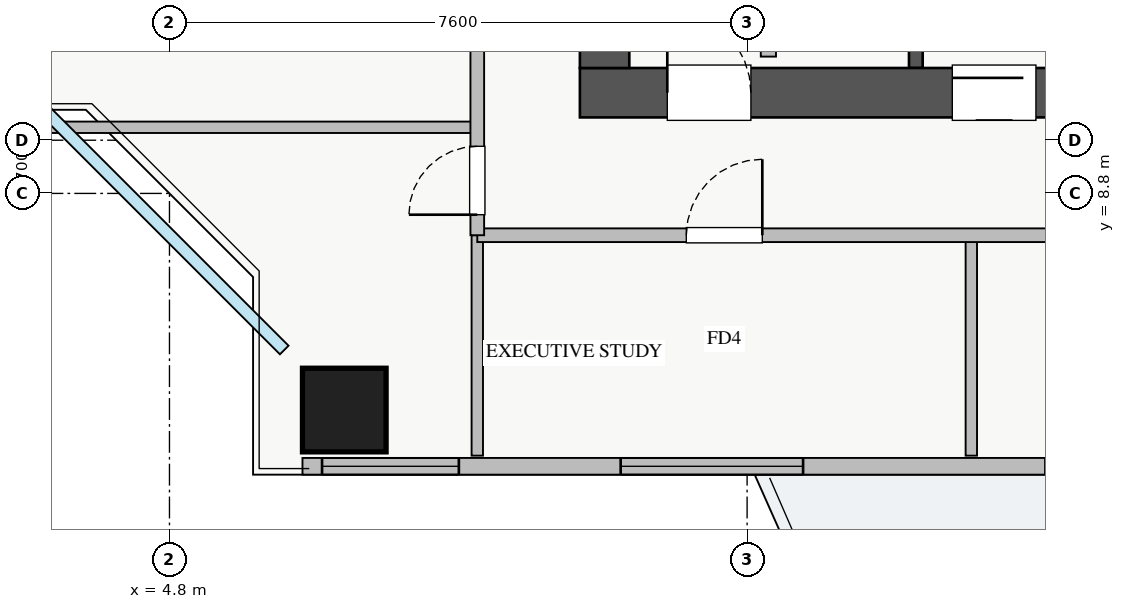
"""IFC4 building model, lengths in metres.
Left out: names, types, materials, properties, quantities, classifications, styles, units other than length and angle.
Written with IfcOpenShell. Run it as: python <this file> out.ifc"""

import sys

from ifc_helpers import new_model, si_unit, direction, frame, frame_2d, origin, origin_2d, place, context, subcontext, project, spatial, rectangle, extrude, source, transform, mapped, element, fill, save


model = new_model("IFC4")
c1 = context("Model", 3, precision=1e-05, world=origin(), true_north=direction((0.0, 1.0)))
c2 = subcontext(c1, "Body", "Model", "MODEL_VIEW")
j1 = project(units=[si_unit("LENGTHUNIT", "METRE"), si_unit("PLANEANGLEUNIT", "RADIAN")], contexts=[c1])
p1 = place(None, origin())
s1 = spatial("IfcSite", under=j1, at=p1, CompositionType="ELEMENT")
p2 = place(p1, origin())
s2 = spatial("IfcBuilding", under=s1, at=p2, CompositionType="ELEMENT")
p3 = place(p2, frame((0.0, 0.0, 116.5)))
s3 = spatial("IfcBuildingStorey", under=s2, at=p3, CompositionType="ELEMENT", Elevation=116.5)
p4 = place(p3, frame((14.62, 10.45, 0.0), z_axis=(0.0, 0.0, 1.0), x_axis=(0.0, 1.0, 0.0)))
e1 = element("IfcWall", 1, at=p4, inside=s3, PredefinedType="SHEAR", context=c2, shape_type="SweptSolid", body=[
    extrude(rectangle(XDim=2.35, YDim=0.18, at=frame_2d((1.175, 0.0))), origin(), (0.0, 0.0, 1.0), 3.07),
])
p5 = place(p3, frame((10.2, 10.125, 0.0), z_axis=(0.0, 0.0, 1.0), x_axis=(1.0, 0.0, 0.0)))
e2 = element("IfcWall", 2, at=p5, inside=s3, PredefinedType="SHEAR", context=c2, shape_type="SweptSolid", body=[
    extrude(rectangle(XDim=17.6, YDim=0.65, at=frame_2d((8.8, 0.0))), origin(), (0.0, 0.0, 1.0), 3.25),
])
p6 = place(p5, frame((1.15, 0.0, 0.0)))
e3 = element("IfcOpeningElement", 3, at=p6, cuts=e2, PredefinedType="OPENING", context=c2, shape_type="SweptSolid", body=[
    extrude(rectangle(XDim=1.1, YDim=2.05, at=frame_2d((0.55, 1.025))), frame((0.0, 0.335, 0.0), z_axis=(0.0, -1.0, 0.0), x_axis=(1.0, 0.0, 0.0)), (0.0, 0.0, 1.0), 0.67),
])
p7 = place(p5, frame((8.3, 0.0, 0.0)))
e4 = element("IfcOpeningElement", 4, at=p7, cuts=e2, PredefinedType="OPENING", context=c2, shape_type="SweptSolid", body=[
    extrude(rectangle(XDim=1.1, YDim=2.05, at=frame_2d((0.55, 1.025))), frame((0.0, 0.335, 0.0), z_axis=(0.0, -1.0, 0.0), x_axis=(1.0, 0.0, 0.0)), (0.0, 0.0, 1.0), 0.67),
])
p8 = place(p5, frame((4.9, 0.0, 0.0)))
e5 = element("IfcOpeningElement", 5, at=p8, cuts=e2, PredefinedType="OPENING", context=c2, shape_type="SweptSolid", body=[
    extrude(rectangle(XDim=1.1, YDim=2.05, at=frame_2d((0.55, 1.025))), frame((0.0, 0.335, 0.0), z_axis=(0.0, -1.0, 0.0), x_axis=(1.0, 0.0, 0.0)), (0.0, 0.0, 1.0), 0.67),
])
p9 = place(p5, frame((14.74, 0.0, 0.0)))
e6 = element("IfcOpeningElement", 6, at=p9, cuts=e2, PredefinedType="OPENING", context=c2, shape_type="SweptSolid", body=[
    extrude(rectangle(XDim=1.0, YDim=2.05, at=frame_2d((0.5, 1.025))), frame((0.0, 0.335, 0.0), z_axis=(0.0, -1.0, 0.0), x_axis=(1.0, 0.0, 0.0)), (0.0, 0.0, 1.0), 0.67),
])
p10 = place(p5, frame((11.67, 0.0, 0.0)))
e7 = element("IfcOpeningElement", 7, at=p10, cuts=e2, PredefinedType="OPENING", context=c2, shape_type="SweptSolid", body=[
    extrude(rectangle(XDim=1.0, YDim=2.05, at=frame_2d((0.5, 1.025))), frame((0.0, 0.335, 0.0), z_axis=(0.0, -1.0, 0.0), x_axis=(1.0, 0.0, 0.0)), (0.0, 0.0, 1.0), 0.67),
])
p11 = place(p3, frame((10.525, 10.45, 0.0), z_axis=(0.0, 0.0, 1.0), x_axis=(0.0, 1.0, 0.0)))
e8 = element("IfcWall", 8, at=p11, inside=s3, PredefinedType="SHEAR", context=c2, shape_type="SweptSolid", body=[
    extrude(rectangle(XDim=5.9, YDim=0.65, at=frame_2d((2.95, 0.0))), origin(), (0.0, 0.0, 1.0), 3.25),
])
m1 = source(origin(), c2, "Body", "SweptSolid", [
    extrude(rectangle(XDim=1.1, YDim=1.1, at=origin_2d()), origin(), (0.0, 0.0, 1.0), 3.25),
])
p12 = place(p3, frame((7.1, 5.95, 0.0), z_axis=(0.0, 0.0, 1.0), x_axis=(1.0, 0.0, 0.0)))
e9 = element("IfcColumn", 9, at=p12, inside=s3, PredefinedType="COLUMN", context=c2, shape_type="MappedRepresentation", body=[
    mapped(m1, transform((0.0, 0.0, 0.0), x_axis=(1.0, 0.0, 0.0), y_axis=(0.0, 1.0, 0.0), z_axis=(0.0, 0.0, 1.0), scale=1.0)),
])
p13 = place(p3, frame((6.55, 5.21, 0.0), z_axis=(0.0, 0.0, 1.0), x_axis=(1.0, 0.0, 0.0)))
e10 = element("IfcWall", 10, at=p13, inside=s3, PredefinedType="STANDARD", context=c2, shape_type="SweptSolid", body=[
    extrude(rectangle(XDim=24.9, YDim=0.22, at=frame_2d((12.45, 0.0))), origin(), (0.0, 0.0, 1.0), 2.61),
])
p14 = place(p13, frame((13.3, 0.0, 0.0)))
e11 = element("IfcOpeningElement", 11, at=p14, cuts=e10, PredefinedType="OPENING", context=c2, shape_type="SweptSolid", body=[
    extrude(rectangle(XDim=1.2, YDim=2.1, at=frame_2d((0.6, 1.05))), frame((0.0, 0.12, 0.0), z_axis=(0.0, -1.0, 0.0), x_axis=(1.0, 0.0, 0.0)), (0.0, 0.0, 1.0), 0.24),
])
p15 = place(p13, frame((0.258, 0.0, 0.9)))
e12 = element("IfcOpeningElement", 12, at=p15, cuts=e10, PredefinedType="OPENING", context=c2, shape_type="SweptSolid", body=[
    extrude(rectangle(XDim=1.8, YDim=1.5, at=frame_2d((0.9, 0.75))), frame((0.0, 0.12, 0.0), z_axis=(0.0, -1.0, 0.0), x_axis=(1.0, 0.0, 0.0)), (0.0, 0.0, 1.0), 0.24),
])
p16 = place(p13, frame((9.775, 0.0, 0.9)))
e13 = element("IfcOpeningElement", 13, at=p16, cuts=e10, PredefinedType="OPENING", context=c2, shape_type="SweptSolid", body=[
    extrude(rectangle(XDim=1.8, YDim=1.5, at=frame_2d((0.9, 0.75))), frame((0.0, 0.12, 0.0), z_axis=(0.0, -1.0, 0.0), x_axis=(1.0, 0.0, 0.0)), (0.0, 0.0, 1.0), 0.24),
])
p17 = place(p13, frame((14.813, 0.0, 0.9)))
e14 = element("IfcOpeningElement", 14, at=p17, cuts=e10, PredefinedType="OPENING", context=c2, shape_type="SweptSolid", body=[
    extrude(rectangle(XDim=1.5, YDim=1.45, at=frame_2d((0.75, 0.725))), frame((0.0, 0.12, 0.0), z_axis=(0.0, -1.0, 0.0), x_axis=(1.0, 0.0, 0.0)), (0.0, 0.0, 1.0), 0.24),
])
p18 = place(p13, frame((20.738, 0.0, 0.9)))
e15 = element("IfcOpeningElement", 15, at=p18, cuts=e10, PredefinedType="OPENING", context=c2, shape_type="SweptSolid", body=[
    extrude(rectangle(XDim=2.1, YDim=1.48, at=frame_2d((1.05, 0.74))), frame((0.0, 0.12, 0.0), z_axis=(0.0, -1.0, 0.0), x_axis=(1.0, 0.0, 0.0)), (0.0, 0.0, 1.0), 0.24),
])
p19 = place(p13, frame((4.187, 0.0, 0.9)))
e16 = element("IfcOpeningElement", 16, at=p19, cuts=e10, PredefinedType="OPENING", context=c2, shape_type="SweptSolid", body=[
    extrude(rectangle(XDim=2.4, YDim=1.5, at=frame_2d((1.2, 0.75))), frame((0.0, 0.12, 0.0), z_axis=(0.0, -1.0, 0.0), x_axis=(1.0, 0.0, 0.0)), (0.0, 0.0, 1.0), 0.24),
])
p20 = place(p3, frame((12.68, 10.6, 0.0), z_axis=(0.0, 0.0, 1.0), x_axis=(0.0, 1.0, 0.0)))
e17 = element("IfcWall", 17, at=p20, inside=s3, PredefinedType="PARTITIONING", context=c2, shape_type="SweptSolid", body=[
    extrude(rectangle(XDim=2.21, YDim=0.2, at=frame_2d((1.105, 0.0))), origin(), (0.0, 0.0, 1.0), 3.07),
])
for number, where, z_axis, x_axis in (
    (18, (15.35, 5.35, 0.0), (0.0, 0.0, 1.0), (0.0, 1.0, 0.0)),
    (19, (8.85, 5.35, 0.0), (0.0, 0.0, 1.0), (0.0, 1.0, 0.0)),
):
    element("IfcWall", number, at=place(p3, frame(where, z_axis=z_axis, x_axis=x_axis)), inside=s3, PredefinedType="PARTITIONING", context=c2, shape_type="SweptSolid", body=[
        extrude(rectangle(XDim=2.9, YDim=0.15, at=frame_2d((1.45, 0.0))), origin(), (0.0, 0.0, 1.0), 3.07),
    ])
p21 = place(p3, frame((8.85, 8.25, 0.0), z_axis=(0.0, 0.0, 1.0), x_axis=(1.0, 0.0, 0.0)))
e20 = element("IfcWall", 20, at=p21, inside=s3, PredefinedType="PARTITIONING", context=c2, shape_type="SweptSolid", body=[
    extrude(rectangle(XDim=23.57, YDim=0.18, at=frame_2d((11.785, 0.0))), origin(), (0.0, 0.0, 1.0), 3.07),
])
p22 = place(p21, frame((2.75, 0.0, 0.0)))
e21 = element("IfcOpeningElement", 21, at=p22, cuts=e20, PredefinedType="OPENING", context=c2, shape_type="SweptSolid", body=[
    extrude(rectangle(XDim=1.0, YDim=2.05, at=frame_2d((0.5, 1.025))), frame((0.0, 0.1, 0.0), z_axis=(0.0, -1.0, 0.0), x_axis=(1.0, 0.0, 0.0)), (0.0, 0.0, 1.0), 0.2),
])
p23 = place(p21, frame((7.875, 0.0, 0.0)))
e22 = element("IfcOpeningElement", 22, at=p23, cuts=e20, PredefinedType="OPENING", context=c2, shape_type="SweptSolid", body=[
    extrude(rectangle(XDim=1.0, YDim=2.05, at=frame_2d((0.5, 1.025))), frame((0.0, 0.1, 0.0), z_axis=(0.0, -1.0, 0.0), x_axis=(1.0, 0.0, 0.0)), (0.0, 0.0, 1.0), 0.2),
])
p24 = place(p21, frame((13.3, 0.0, 0.0)))
e23 = element("IfcOpeningElement", 23, at=p24, cuts=e20, PredefinedType="OPENING", context=c2, shape_type="SweptSolid", body=[
    extrude(rectangle(XDim=1.0, YDim=2.05, at=frame_2d((0.5, 1.025))), frame((0.0, 0.1, 0.0), z_axis=(0.0, -1.0, 0.0), x_axis=(1.0, 0.0, 0.0)), (0.0, 0.0, 1.0), 0.2),
])
p25 = place(p21, frame((19.74, 0.0, 0.0)))
e24 = element("IfcOpeningElement", 24, at=p25, cuts=e20, PredefinedType="OPENING", context=c2, shape_type="SweptSolid", body=[
    extrude(rectangle(XDim=1.0, YDim=2.05, at=frame_2d((0.5, 1.025))), frame((0.0, 0.1, 0.0), z_axis=(0.0, -1.0, 0.0), x_axis=(1.0, 0.0, 0.0)), (0.0, 0.0, 1.0), 0.2),
])
p26 = place(p3, frame((1.35, 9.67, 0.0), z_axis=(0.0, 0.0, 1.0), x_axis=(1.0, 0.0, 0.0)))
e25 = element("IfcWall", 25, at=p26, inside=s3, PredefinedType="PARTITIONING", context=c2, shape_type="SweptSolid", body=[
    extrude(rectangle(XDim=7.5, YDim=0.15, at=frame_2d((3.75, 0.0))), origin(), (0.0, 0.0, 1.0), 3.07),
])
p27 = place(p3, frame((8.85, 8.25, 0.0), z_axis=(0.0, 0.0, 1.0), x_axis=(0.0, 1.0, 0.0)))
e26 = element("IfcWall", 26, at=p27, inside=s3, PredefinedType="PARTITIONING", context=c2, shape_type="SweptSolid", body=[
    extrude(rectangle(XDim=29.5, YDim=0.18, at=frame_2d((14.75, 0.0))), origin(), (0.0, 0.0, 1.0), 3.07),
])
p28 = place(p27, frame((28.155, 0.0, 0.0)))
e27 = element("IfcOpeningElement", 27, at=p28, cuts=e26, PredefinedType="OPENING", context=c2, shape_type="SweptSolid", body=[
    extrude(rectangle(XDim=0.9, YDim=2.05, at=frame_2d((0.45, 1.025))), frame((0.0, 0.1, 0.0), z_axis=(0.0, -1.0, 0.0), x_axis=(1.0, 0.0, 0.0)), (0.0, 0.0, 1.0), 0.2),
])
p29 = place(p27, frame((0.27, 0.0, 0.0)))
e28 = element("IfcOpeningElement", 28, at=p29, cuts=e26, PredefinedType="OPENING", context=c2, shape_type="SweptSolid", body=[
    extrude(rectangle(XDim=0.9, YDim=2.05, at=frame_2d((0.45, 1.025))), frame((0.0, 0.1, 0.0), z_axis=(0.0, -1.0, 0.0), x_axis=(1.0, 0.0, 0.0)), (0.0, 0.0, 1.0), 0.2),
])
p30 = place(p27, frame((7.255, 0.0, 0.0)))
e29 = element("IfcOpeningElement", 29, at=p30, cuts=e26, PredefinedType="OPENING", context=c2, shape_type="SweptSolid", body=[
    extrude(rectangle(XDim=1.0, YDim=2.05, at=frame_2d((0.5, 1.025))), frame((0.0, 0.1, 0.0), z_axis=(0.0, -1.0, 0.0), x_axis=(1.0, 0.0, 0.0)), (0.0, 0.0, 1.0), 0.2),
])
p31 = place(p27, frame((16.675, 0.0, 0.0)))
e30 = element("IfcOpeningElement", 30, at=p31, cuts=e26, PredefinedType="OPENING", context=c2, shape_type="SweptSolid", body=[
    extrude(rectangle(XDim=1.0, YDim=2.05, at=frame_2d((0.5, 1.025))), frame((0.0, 0.1, 0.0), z_axis=(0.0, -1.0, 0.0), x_axis=(1.0, 0.0, 0.0)), (0.0, 0.0, 1.0), 0.2),
])
m2 = source(origin(), c2, "Body", "SweptSolid", [
    extrude(rectangle(XDim=1.8, YDim=1.5, at=frame_2d((0.9, 0.75))), frame((0.0, 0.03, 0.0), z_axis=(0.0, -1.0, 0.0), x_axis=(1.0, 0.0, 0.0)), (0.0, 0.0, 1.0), 0.06),
])
p32 = place(p15, origin())
e31 = element("IfcWindow", 31, at=p32, inside=s3, PartitioningType="TRIPLE_PANEL_VERTICAL", PredefinedType="WINDOW", context=c2, shape_type="MappedRepresentation", body=[
    mapped(m2, transform((0.0, 0.0, 0.0), x_axis=(1.0, 0.0, 0.0), y_axis=(0.0, 1.0, 0.0), z_axis=(0.0, 0.0, 1.0), scale=1.0)),
])
fill(e12, e31)
p33 = place(p16, origin())
e32 = element("IfcWindow", 32, at=p33, inside=s3, PartitioningType="DOUBLE_PANEL_VERTICAL", PredefinedType="WINDOW", context=c2, shape_type="MappedRepresentation", body=[
    mapped(m2, transform((0.0, 0.0, 0.0), x_axis=(1.0, 0.0, 0.0), y_axis=(0.0, 1.0, 0.0), z_axis=(0.0, 0.0, 1.0), scale=1.0)),
])
fill(e13, e32)
m3 = source(origin(), c2, "Body", "SweptSolid", [
    extrude(rectangle(XDim=1.1, YDim=2.05, at=frame_2d((0.55, 1.025))), frame((0.0, 0.025, 0.0), z_axis=(0.0, -1.0, 0.0), x_axis=(1.0, 0.0, 0.0)), (0.0, 0.0, 1.0), 0.05),
])
p34 = place(p6, origin())
e33 = element("IfcDoor", 33, at=p34, inside=s3, OperationType="SINGLE_SWING_LEFT", PredefinedType="DOOR", context=c2, shape_type="MappedRepresentation", body=[
    mapped(m3, transform((0.0, 0.0, 0.0), x_axis=(1.0, 0.0, 0.0), y_axis=(0.0, 1.0, 0.0), z_axis=(0.0, 0.0, 1.0), scale=1.0)),
])
fill(e3, e33)
p35 = place(p8, origin())
e34 = element("IfcDoor", 34, at=p35, inside=s3, OperationType="SLIDING_TO_RIGHT", PredefinedType="DOOR", context=c2, shape_type="MappedRepresentation", body=[
    mapped(m3, transform((0.0, 0.0, 0.0), x_axis=(1.0, 0.0, 0.0), y_axis=(0.0, 1.0, 0.0), z_axis=(0.0, 0.0, 1.0), scale=1.0)),
])
fill(e5, e34)
m4 = source(origin(), c2, "Body", "SweptSolid", [
    extrude(rectangle(XDim=1.0, YDim=2.05, at=frame_2d((0.5, 1.025))), frame((0.0, 0.025, 0.0), z_axis=(0.0, -1.0, 0.0), x_axis=(1.0, 0.0, 0.0)), (0.0, 0.0, 1.0), 0.05),
])
p36 = place(p22, origin())
e35 = element("IfcDoor", 35, at=p36, inside=s3, OperationType="SINGLE_SWING_RIGHT", PredefinedType="DOOR", context=c2, shape_type="MappedRepresentation", body=[
    mapped(m4, transform((0.0, 0.0, 0.0), x_axis=(1.0, 0.0, 0.0), y_axis=(0.0, 1.0, 0.0), z_axis=(0.0, 0.0, 1.0), scale=1.0)),
])
fill(e21, e35)
m5 = source(origin(), c2, "Body", "SweptSolid", [
    extrude(rectangle(XDim=0.9, YDim=2.05, at=frame_2d((0.45, 1.025))), frame((0.0, 0.025, 0.0), z_axis=(0.0, -1.0, 0.0), x_axis=(1.0, 0.0, 0.0)), (0.0, 0.0, 1.0), 0.05),
])
p37 = place(p29, origin())
e36 = element("IfcDoor", 36, at=p37, inside=s3, OperationType="SINGLE_SWING_LEFT", PredefinedType="DOOR", context=c2, shape_type="MappedRepresentation", body=[
    mapped(m5, transform((0.0, 0.0, 0.0), x_axis=(1.0, 0.0, 0.0), y_axis=(0.0, 1.0, 0.0), z_axis=(0.0, 0.0, 1.0), scale=1.0)),
])
fill(e28, e36)
m6 = source(origin(), c2, "Body", "SweptSolid", [
    extrude(rectangle(XDim=2.4, YDim=1.5, at=frame_2d((1.2, 0.75))), frame((0.0, 0.03, 0.0), z_axis=(0.0, -1.0, 0.0), x_axis=(1.0, 0.0, 0.0)), (0.0, 0.0, 1.0), 0.06),
])
p38 = place(p19, origin())
e37 = element("IfcWindow", 37, at=p38, inside=s3, PartitioningType="TRIPLE_PANEL_VERTICAL", PredefinedType="WINDOW", context=c2, shape_type="MappedRepresentation", body=[
    mapped(m6, transform((0.0, 0.0, 0.0), x_axis=(1.0, 0.0, 0.0), y_axis=(0.0, 1.0, 0.0), z_axis=(0.0, 0.0, 1.0), scale=1.0)),
])
fill(e16, e37)
save(model, sys.argv[1])
